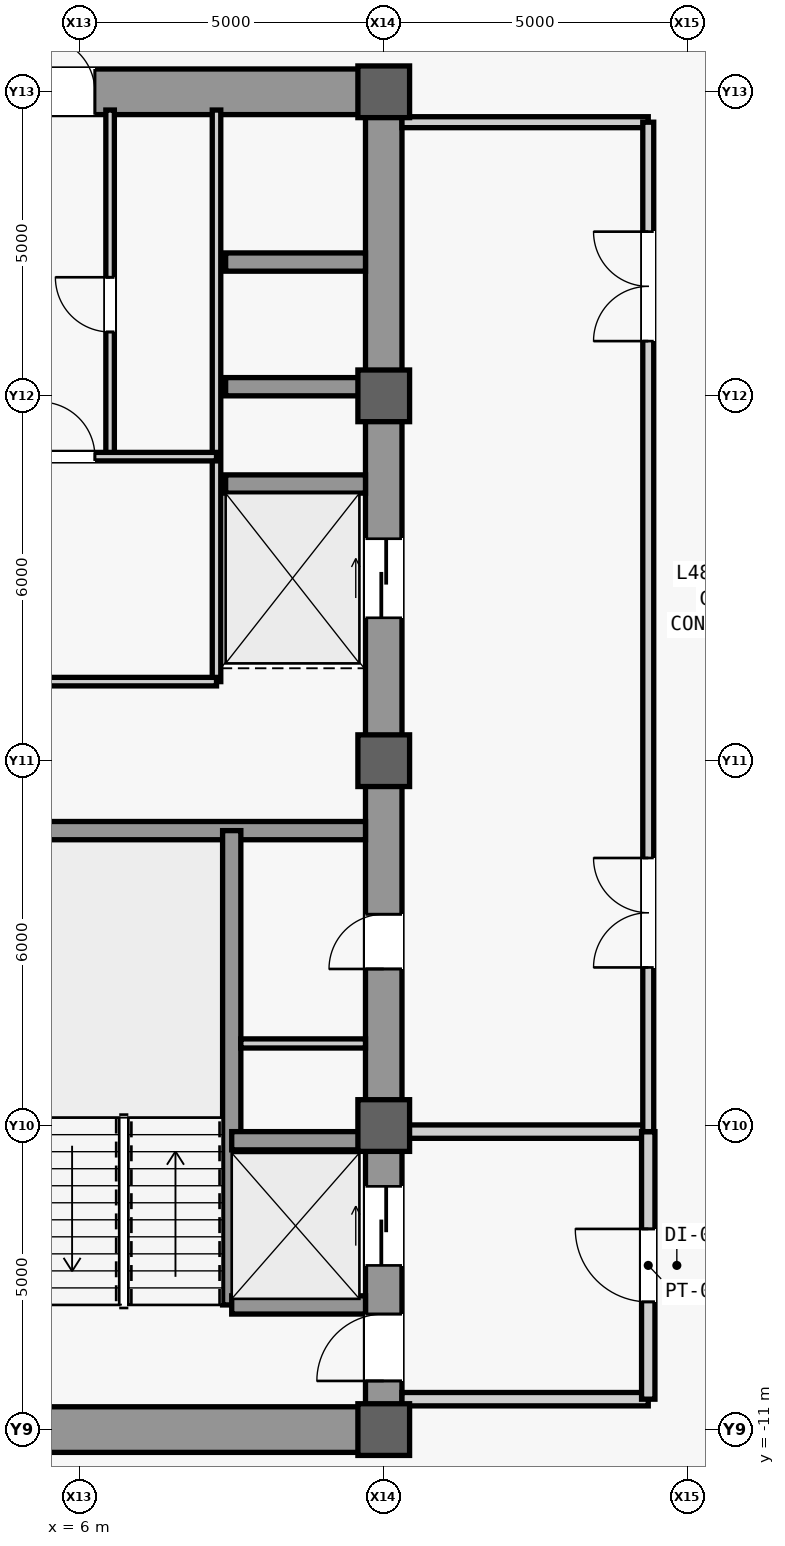
"""IFC4 building model, lengths in metres.
Left out: names, types, materials, properties, quantities, classifications, styles, units other than length and angle.
Written with IfcOpenShell. Run it as: python <this file> out.ifc"""

import sys

from ifc_helpers import new_model, si_unit, direction, frame, frame_2d, origin, origin_2d, place, context, subcontext, project, spatial, rectangle, extrude, source, transform, mapped, element, fill, save


model = new_model("IFC4")
c1 = context("Model", 3, precision=1e-05, world=origin(), true_north=direction((0.0, 1.0)))
c2 = subcontext(c1, "Body", "Model", "MODEL_VIEW")
j1 = project(units=[si_unit("LENGTHUNIT", "METRE"), si_unit("PLANEANGLEUNIT", "RADIAN")], contexts=[c1])
p1 = place(None, origin())
s1 = spatial("IfcSite", under=j1, at=p1, CompositionType="ELEMENT")
p2 = place(p1, origin())
s2 = spatial("IfcBuilding", under=s1, at=p2, CompositionType="ELEMENT")
p3 = place(p2, frame((0.0, 0.0, 207.1)))
s3 = spatial("IfcBuildingStorey", under=s2, at=p3, CompositionType="ELEMENT", Elevation=207.1)
m1 = source(origin(), c2, "Body", "SweptSolid", [
    extrude(rectangle(XDim=22.0, YDim=0.6, at=frame_2d((11.0, 0.0))), origin(), (0.0, 0.0, 1.0), 3.78),
])
p4 = place(p3, frame((11.0, -11.0, 0.0), z_axis=(0.0, 0.0, 1.0), x_axis=(0.0, 1.0, 0.0)))
e1 = element("IfcWall", 1, at=p4, inside=s3, PredefinedType="SHEAR", context=c2, shape_type="MappedRepresentation", body=[
    mapped(m1, transform((0.0, 0.0, 0.0), scale=1.0)),
])
m2 = source(origin(), c2, "Body", "SweptSolid", [
    extrude(rectangle(XDim=1.1, YDim=2.2, at=frame_2d((0.55, 1.1))), frame((0.0, 0.31, 0.0), z_axis=(0.0, -1.0, 0.0), x_axis=(1.0, 0.0, 0.0)), (0.0, 0.0, 1.0), 0.62),
])
p5 = place(p4, frame((0.8, 0.0, 0.0)))
e2 = element("IfcOpeningElement", 2, at=p5, cuts=e1, PredefinedType="OPENING", context=c2, shape_type="MappedRepresentation", body=[
    mapped(m2, transform((0.0, 0.0, 0.0), scale=1.0)),
])
m3 = source(origin(), c2, "Body", "SweptSolid", [
    extrude(rectangle(XDim=0.9, YDim=2.15, at=frame_2d((0.45, 1.075))), frame((0.0, 0.31, 0.0), z_axis=(0.0, -1.0, 0.0), x_axis=(1.0, 0.0, 0.0)), (0.0, 0.0, 1.0), 0.62),
])
p6 = place(p4, frame((7.575, 0.0, 0.0)))
e3 = element("IfcOpeningElement", 3, at=p6, cuts=e1, PredefinedType="OPENING", context=c2, shape_type="MappedRepresentation", body=[
    mapped(m3, transform((0.0, 0.0, 0.0), scale=1.0)),
])
m4 = source(origin(), c2, "Body", "SweptSolid", [
    extrude(rectangle(XDim=1.3, YDim=2.3, at=frame_2d((0.65, 1.15))), frame((0.0, 0.31, 0.0), z_axis=(0.0, -1.0, 0.0), x_axis=(1.0, 0.0, 0.0)), (0.0, 0.0, 1.0), 0.62),
])
p7 = place(p4, frame((2.7, 0.0, 0.0)))
e4 = element("IfcOpeningElement", 4, at=p7, cuts=e1, PredefinedType="OPENING", context=c2, shape_type="MappedRepresentation", body=[
    mapped(m4, transform((0.0, 0.0, 0.0), scale=1.0)),
])
p8 = place(p4, frame((13.35, 0.0, 0.0)))
e5 = element("IfcOpeningElement", 5, at=p8, cuts=e1, PredefinedType="OPENING", context=c2, shape_type="MappedRepresentation", body=[
    mapped(m4, transform((0.0, 0.0, 0.0), scale=1.0)),
])
m5 = source(origin(), c2, "Body", "SweptSolid", [
    extrude(rectangle(XDim=5.85, YDim=0.75, at=frame_2d((2.925, 0.0))), origin(), (0.0, 0.0, 1.0), 3.78),
])
p9 = place(p3, frame((4.85, -11.0, 0.0), z_axis=(0.0, 0.0, 1.0), x_axis=(1.0, 0.0, 0.0)))
e6 = element("IfcWall", 6, at=p9, inside=s3, PredefinedType="SHEAR", context=c2, shape_type="MappedRepresentation", body=[
    mapped(m5, transform((0.0, 0.0, 0.0), scale=1.0)),
])
p10 = place(p3, frame((4.85, 11.0, 0.0), z_axis=(0.0, 0.0, 1.0), x_axis=(1.0, 0.0, 0.0)))
e7 = element("IfcWall", 7, at=p10, inside=s3, PredefinedType="SHEAR", context=c2, shape_type="MappedRepresentation", body=[
    mapped(m5, transform((0.0, 0.0, 0.0), scale=1.0)),
])
m6 = source(origin(), c2, "Body", "SweptSolid", [
    extrude(rectangle(XDim=0.9, YDim=2.15, at=frame_2d((0.45, 1.075))), frame((0.0, 0.385, 0.0), z_axis=(0.0, -1.0, 0.0), x_axis=(1.0, 0.0, 0.0)), (0.0, 0.0, 1.0), 0.77),
])
p11 = place(p10, frame((0.5, 0.0, 0.0)))
e8 = element("IfcOpeningElement", 8, at=p11, cuts=e7, PredefinedType="OPENING", context=c2, shape_type="MappedRepresentation", body=[
    mapped(m6, transform((0.0, 0.0, 0.0), scale=1.0)),
])
m7 = source(origin(), c2, "Body", "SweptSolid", [
    extrude(rectangle(XDim=5.6, YDim=0.3, at=frame_2d((2.8, 0.0))), origin(), (0.0, 0.0, 1.0), 3.78),
])
p12 = place(p3, frame((5.1, -1.15, 0.0), z_axis=(0.0, 0.0, 1.0), x_axis=(1.0, 0.0, 0.0)))
e9 = element("IfcWall", 9, at=p12, inside=s3, PredefinedType="SHEAR", context=c2, shape_type="MappedRepresentation", body=[
    mapped(m7, transform((0.0, 0.0, 0.0), scale=1.0)),
])
m8 = source(origin(), c2, "Body", "SweptSolid", [
    extrude(rectangle(XDim=0.85, YDim=0.85, at=origin_2d()), origin(), (0.0, 0.0, 1.0), 4.0),
])
for number, where, z_axis, x_axis in (
    (10, (11.0, -11.0, 0.0), (0.0, 0.0, 1.0), (1.0, 0.0, 0.0)),
    (11, (11.0, -6.0, 0.0), (0.0, 0.0, 1.0), (1.0, 0.0, 0.0)),
    (12, (11.0, 0.0, 0.0), (0.0, 0.0, 1.0), (1.0, 0.0, 0.0)),
    (13, (11.0, 6.0, 0.0), (0.0, 0.0, 1.0), (1.0, 0.0, 0.0)),
    (14, (11.0, 11.0, 0.0), (0.0, 0.0, 1.0), (1.0, 0.0, 0.0)),
):
    element("IfcColumn", number, at=place(p3, frame(where, z_axis=z_axis, x_axis=x_axis)), inside=s3, PredefinedType="COLUMN", context=c2, shape_type="MappedRepresentation", body=[
        mapped(m8, transform((0.0, 0.0, 0.0), scale=1.0)),
    ])
m9 = source(origin(), c2, "Body", "SweptSolid", [
    extrude(rectangle(XDim=7.8, YDim=0.3, at=frame_2d((3.9, 0.0))), origin(), (0.0, 0.0, 1.0), 3.78),
])
p13 = place(p3, frame((8.5, -8.95, 0.0), z_axis=(0.0, 0.0, 1.0), x_axis=(0.0, 1.0, 0.0)))
e15 = element("IfcWall", 15, at=p13, inside=s3, PredefinedType="SHEAR", context=c2, shape_type="MappedRepresentation", body=[
    mapped(m9, transform((0.0, 0.0, 0.0), scale=1.0)),
])
m10 = source(origin(), c2, "Body", "SweptSolid", [
    extrude(rectangle(XDim=2.2, YDim=0.3, at=frame_2d((1.1, 0.0))), origin(), (0.0, 0.0, 1.0), 3.78),
])
for number, where, z_axis, x_axis in (
    (16, (8.5, -8.95, 0.0), (0.0, 0.0, 1.0), (1.0, 0.0, 0.0)),
    (17, (8.5, -6.25, 0.0), (0.0, 0.0, 1.0), (1.0, 0.0, 0.0)),
):
    element("IfcWall", number, at=place(p3, frame(where, z_axis=z_axis, x_axis=x_axis)), inside=s3, PredefinedType="SHEAR", context=c2, shape_type="MappedRepresentation", body=[
        mapped(m10, transform((0.0, 0.0, 0.0), scale=1.0)),
    ])
m11 = source(origin(), c2, "Body", "SweptSolid", [
    extrude(rectangle(XDim=2.3, YDim=0.3, at=frame_2d((1.15, 0.0))), origin(), (0.0, 0.0, 1.0), 3.78),
])
for number, where, z_axis, x_axis in (
    (18, (8.4, 4.55, 0.0), (0.0, 0.0, 1.0), (1.0, 0.0, 0.0)),
    (19, (8.4, 6.15, 0.0), (0.0, 0.0, 1.0), (1.0, 0.0, 0.0)),
    (20, (8.4, 8.2, 0.0), (0.0, 0.0, 1.0), (1.0, 0.0, 0.0)),
):
    element("IfcWall", number, at=place(p3, frame(where, z_axis=z_axis, x_axis=x_axis)), inside=s3, PredefinedType="SHEAR", context=c2, shape_type="MappedRepresentation", body=[
        mapped(m11, transform((0.0, 0.0, 0.0), scale=1.0)),
    ])
m12 = source(origin(), c2, "Body", "SweptSolid", [
    extrude(rectangle(XDim=2.05, YDim=0.15, at=frame_2d((1.025, 0.0))), origin(), (0.0, 0.0, 1.0), 3.78),
])
p14 = place(p3, frame((8.65, -4.65, 0.0), z_axis=(0.0, 0.0, 1.0), x_axis=(1.0, 0.0, 0.0)))
e21 = element("IfcWall", 21, at=p14, inside=s3, PredefinedType="PARTITIONING", context=c2, shape_type="MappedRepresentation", body=[
    mapped(m12, transform((0.0, 0.0, 0.0), scale=1.0)),
])
m13 = source(origin(), c2, "Body", "SweptSolid", [
    extrude(rectangle(XDim=9.4, YDim=0.14, at=frame_2d((4.7, 0.0))), origin(), (0.0, 0.0, 1.0), 3.78),
])
p15 = place(p3, frame((8.25, 1.3, 0.0), z_axis=(0.0, 0.0, 1.0), x_axis=(0.0, 1.0, 0.0)))
e22 = element("IfcWall", 22, at=p15, inside=s3, PredefinedType="PARTITIONING", context=c2, shape_type="MappedRepresentation", body=[
    mapped(m13, transform((0.0, 0.0, 0.0), scale=1.0)),
])
m14 = source(origin(), c2, "Body", "SweptSolid", [
    extrude(rectangle(XDim=3.15, YDim=0.14, at=frame_2d((1.575, 0.0))), origin(), (0.0, 0.0, 1.0), 3.78),
])
p16 = place(p3, frame((5.1, 1.3, 0.0), z_axis=(0.0, 0.0, 1.0), x_axis=(1.0, 0.0, 0.0)))
e23 = element("IfcWall", 23, at=p16, inside=s3, PredefinedType="PARTITIONING", context=c2, shape_type="MappedRepresentation", body=[
    mapped(m14, transform((0.0, 0.0, 0.0), scale=1.0)),
])
m15 = source(origin(), c2, "Body", "SweptSolid", [
    extrude(rectangle(XDim=5.7, YDim=0.14, at=frame_2d((2.85, 0.0))), origin(), (0.0, 0.0, 1.0), 3.78),
])
p17 = place(p3, frame((6.5, 5.0, 0.0), z_axis=(0.0, 0.0, 1.0), x_axis=(0.0, 1.0, 0.0)))
e24 = element("IfcWall", 24, at=p17, inside=s3, PredefinedType="PARTITIONING", context=c2, shape_type="MappedRepresentation", body=[
    mapped(m15, transform((0.0, 0.0, 0.0), scale=1.0)),
])
m16 = source(origin(), c2, "Body", "SweptSolid", [
    extrude(rectangle(XDim=0.9, YDim=2.15, at=frame_2d((0.45, 1.075))), frame((0.0, 0.08, 0.0), z_axis=(0.0, -1.0, 0.0), x_axis=(1.0, 0.0, 0.0)), (0.0, 0.0, 1.0), 0.16),
])
p18 = place(p17, frame((2.05, 0.0, 0.0)))
e25 = element("IfcOpeningElement", 25, at=p18, cuts=e24, PredefinedType="OPENING", context=c2, shape_type="MappedRepresentation", body=[
    mapped(m16, transform((0.0, 0.0, 0.0), scale=1.0)),
])
p19 = place(p3, frame((5.1, 5.0, 0.0), z_axis=(0.0, 0.0, 1.0), x_axis=(1.0, 0.0, 0.0)))
e26 = element("IfcWall", 26, at=p19, inside=s3, PredefinedType="PARTITIONING", context=c2, shape_type="MappedRepresentation", body=[
    mapped(m14, transform((0.0, 0.0, 0.0), scale=1.0)),
])
p20 = place(p19, frame((0.25, 0.0, 0.0)))
e27 = element("IfcOpeningElement", 27, at=p20, cuts=e26, PredefinedType="OPENING", context=c2, shape_type="MappedRepresentation", body=[
    mapped(m16, transform((0.0, 0.0, 0.0), scale=1.0)),
])
m17 = source(origin(), c2, "Body", "SweptSolid", [
    extrude(rectangle(XDim=4.05, YDim=0.22, at=frame_2d((2.025, 0.0))), origin(), (0.0, 0.0, 1.0), 3.78),
])
p21 = place(p3, frame((11.3, -10.5, 0.0), z_axis=(0.0, 0.0, 1.0), x_axis=(1.0, 0.0, 0.0)))
e28 = element("IfcWall", 28, at=p21, inside=s3, PredefinedType="PARTITIONING", context=c2, shape_type="MappedRepresentation", body=[
    mapped(m17, transform((0.0, 0.0, 0.0), scale=1.0)),
])
m18 = source(origin(), c2, "Body", "SweptSolid", [
    extrude(rectangle(XDim=4.05, YDim=0.22, at=frame_2d((2.025, 0.0))), origin(), (0.0, 0.0, 1.0), 2.38),
])
p22 = place(p3, frame((11.3, -6.1, 0.0), z_axis=(0.0, 0.0, 1.0), x_axis=(1.0, 0.0, 0.0)))
e29 = element("IfcWall", 29, at=p22, inside=s3, PredefinedType="PARTITIONING", context=c2, shape_type="MappedRepresentation", body=[
    mapped(m18, transform((0.0, 0.0, 0.0), scale=1.0)),
])
m19 = source(origin(), c2, "Body", "SweptSolid", [
    extrude(rectangle(XDim=4.4, YDim=0.22, at=frame_2d((2.2, 0.0))), origin(), (0.0, 0.0, 1.0), 3.78),
])
p23 = place(p3, frame((15.35, -10.5, 0.0), z_axis=(0.0, 0.0, 1.0), x_axis=(0.0, 1.0, 0.0)))
e30 = element("IfcWall", 30, at=p23, inside=s3, PredefinedType="PARTITIONING", context=c2, shape_type="MappedRepresentation", body=[
    mapped(m19, transform((0.0, 0.0, 0.0), scale=1.0)),
])
m20 = source(origin(), c2, "Body", "SweptSolid", [
    extrude(rectangle(XDim=1.2, YDim=2.2, at=frame_2d((0.6, 1.1))), frame((0.0, 0.12, 0.0), z_axis=(0.0, -1.0, 0.0), x_axis=(1.0, 0.0, 0.0)), (0.0, 0.0, 1.0), 0.24),
])
p24 = place(p23, frame((1.6, 0.0, 0.0)))
e31 = element("IfcOpeningElement", 31, at=p24, cuts=e30, PredefinedType="OPENING", context=c2, shape_type="MappedRepresentation", body=[
    mapped(m20, transform((0.0, 0.0, 0.0), scale=1.0)),
])
m21 = source(origin(), c2, "Body", "SweptSolid", [
    extrude(rectangle(XDim=4.05, YDim=0.18, at=frame_2d((2.025, 0.0))), origin(), (0.0, 0.0, 1.0), 3.78),
])
p25 = place(p3, frame((11.3, 10.5, 0.0), z_axis=(0.0, 0.0, 1.0), x_axis=(1.0, 0.0, 0.0)))
e32 = element("IfcWall", 32, at=p25, inside=s3, PredefinedType="PARTITIONING", context=c2, shape_type="MappedRepresentation", body=[
    mapped(m21, transform((0.0, 0.0, 0.0), scale=1.0)),
])
m22 = source(origin(), c2, "Body", "SweptSolid", [
    extrude(rectangle(XDim=16.6, YDim=0.18, at=frame_2d((8.3, 0.0))), origin(), (0.0, 0.0, 1.0), 3.78),
])
p26 = place(p3, frame((15.35, -6.1, 0.0), z_axis=(0.0, 0.0, 1.0), x_axis=(0.0, 1.0, 0.0)))
e33 = element("IfcWall", 33, at=p26, inside=s3, PredefinedType="PARTITIONING", context=c2, shape_type="MappedRepresentation", body=[
    mapped(m22, transform((0.0, 0.0, 0.0), scale=1.0)),
])
m23 = source(origin(), c2, "Body", "SweptSolid", [
    extrude(rectangle(XDim=1.8, YDim=2.25, at=frame_2d((0.9, 1.125))), frame((0.0, 0.1, 0.0), z_axis=(0.0, -1.0, 0.0), x_axis=(1.0, 0.0, 0.0)), (0.0, 0.0, 1.0), 0.2),
])
p27 = place(p26, frame((2.7, 0.0, 0.0)))
e34 = element("IfcOpeningElement", 34, at=p27, cuts=e33, PredefinedType="OPENING", context=c2, shape_type="MappedRepresentation", body=[
    mapped(m23, transform((0.0, 0.0, 0.0), scale=1.0)),
])
p28 = place(p26, frame((13.0, 0.0, 0.0)))
e35 = element("IfcOpeningElement", 35, at=p28, cuts=e33, PredefinedType="OPENING", context=c2, shape_type="MappedRepresentation", body=[
    mapped(m23, transform((0.0, 0.0, 0.0), scale=1.0)),
])
m24 = source(origin(), c2, "Body", "SweptSolid", [
    extrude(rectangle(XDim=1.1, YDim=2.2, at=frame_2d((0.55, 1.1))), frame((0.0, 0.025, 0.0), z_axis=(0.0, -1.0, 0.0), x_axis=(1.0, 0.0, 0.0)), (0.0, 0.0, 1.0), 0.05),
])
p29 = place(p5, origin())
e36 = element("IfcDoor", 36, at=p29, inside=s3, OperationType="SINGLE_SWING_LEFT", PredefinedType="DOOR", context=c2, shape_type="MappedRepresentation", body=[
    mapped(m24, transform((0.0, 0.0, 0.0), scale=1.0)),
])
fill(e2, e36)
m25 = source(origin(), c2, "Body", "SweptSolid", [
    extrude(rectangle(XDim=0.9, YDim=2.15, at=frame_2d((0.45, 1.075))), frame((0.0, 0.025, 0.0), z_axis=(0.0, -1.0, 0.0), x_axis=(1.0, 0.0, 0.0)), (0.0, 0.0, 1.0), 0.05),
])
p30 = place(p6, origin())
e37 = element("IfcDoor", 37, at=p30, inside=s3, OperationType="SINGLE_SWING_LEFT", PredefinedType="DOOR", context=c2, shape_type="MappedRepresentation", body=[
    mapped(m25, transform((0.0, 0.0, 0.0), scale=1.0)),
])
fill(e3, e37)
p31 = place(p11, origin())
e38 = element("IfcDoor", 38, at=p31, inside=s3, OperationType="SINGLE_SWING_LEFT", PredefinedType="DOOR", context=c2, shape_type="MappedRepresentation", body=[
    mapped(m25, transform((0.0, 0.0, 0.0), scale=1.0)),
])
fill(e8, e38)
p32 = place(p18, origin())
e39 = element("IfcDoor", 39, at=p32, inside=s3, OperationType="SINGLE_SWING_RIGHT", PredefinedType="DOOR", context=c2, shape_type="MappedRepresentation", body=[
    mapped(m25, transform((0.0, 0.0, 0.0), scale=1.0)),
])
fill(e25, e39)
p33 = place(p20, origin())
e40 = element("IfcDoor", 40, at=p33, inside=s3, OperationType="SINGLE_SWING_LEFT", PredefinedType="DOOR", context=c2, shape_type="MappedRepresentation", body=[
    mapped(m25, transform((0.0, 0.0, 0.0), scale=1.0)),
])
fill(e27, e40)
m26 = source(origin(), c2, "Body", "SweptSolid", [
    extrude(rectangle(XDim=1.2, YDim=2.2, at=frame_2d((0.6, 1.1))), frame((0.0, 0.025, 0.0), z_axis=(0.0, -1.0, 0.0), x_axis=(1.0, 0.0, 0.0)), (0.0, 0.0, 1.0), 0.05),
])
p34 = place(p24, origin())
e41 = element("IfcDoor", 41, at=p34, inside=s3, OperationType="SINGLE_SWING_RIGHT", PredefinedType="DOOR", context=c2, shape_type="MappedRepresentation", body=[
    mapped(m26, transform((0.0, 0.0, 0.0), scale=1.0)),
])
fill(e31, e41)
m27 = source(origin(), c2, "Body", "SweptSolid", [
    extrude(rectangle(XDim=1.8, YDim=2.25, at=frame_2d((0.9, 1.125))), frame((0.0, 0.025, 0.0), z_axis=(0.0, -1.0, 0.0), x_axis=(1.0, 0.0, 0.0)), (0.0, 0.0, 1.0), 0.05),
])
p35 = place(p27, origin())
e42 = element("IfcDoor", 42, at=p35, inside=s3, OperationType="SINGLE_SWING_RIGHT", PredefinedType="DOOR", context=c2, shape_type="MappedRepresentation", body=[
    mapped(m27, transform((0.0, 0.0, 0.0), scale=1.0)),
])
fill(e34, e42)
p36 = place(p28, origin())
e43 = element("IfcDoor", 43, at=p36, inside=s3, OperationType="SINGLE_SWING_LEFT", PredefinedType="DOOR", context=c2, shape_type="MappedRepresentation", body=[
    mapped(m27, transform((0.0, 0.0, 0.0), scale=1.0)),
])
fill(e35, e43)
m28 = source(origin(), c2, "Body", "SweptSolid", [
    extrude(rectangle(XDim=1.3, YDim=2.3, at=frame_2d((0.65, 1.15))), frame((0.0, 0.025, 0.0), z_axis=(0.0, -1.0, 0.0), x_axis=(1.0, 0.0, 0.0)), (0.0, 0.0, 1.0), 0.05),
])
p37 = place(p7, origin())
e44 = element("IfcDoor", 44, at=p37, inside=s3, OperationType="SLIDING_TO_LEFT", PredefinedType="DOOR", context=c2, shape_type="MappedRepresentation", body=[
    mapped(m28, transform((0.0, 0.0, 0.0), scale=1.0)),
])
fill(e4, e44)
p38 = place(p8, origin())
e45 = element("IfcDoor", 45, at=p38, inside=s3, OperationType="SLIDING_TO_LEFT", PredefinedType="DOOR", context=c2, shape_type="MappedRepresentation", body=[
    mapped(m28, transform((0.0, 0.0, 0.0), scale=1.0)),
])
fill(e5, e45)
save(model, sys.argv[1])
